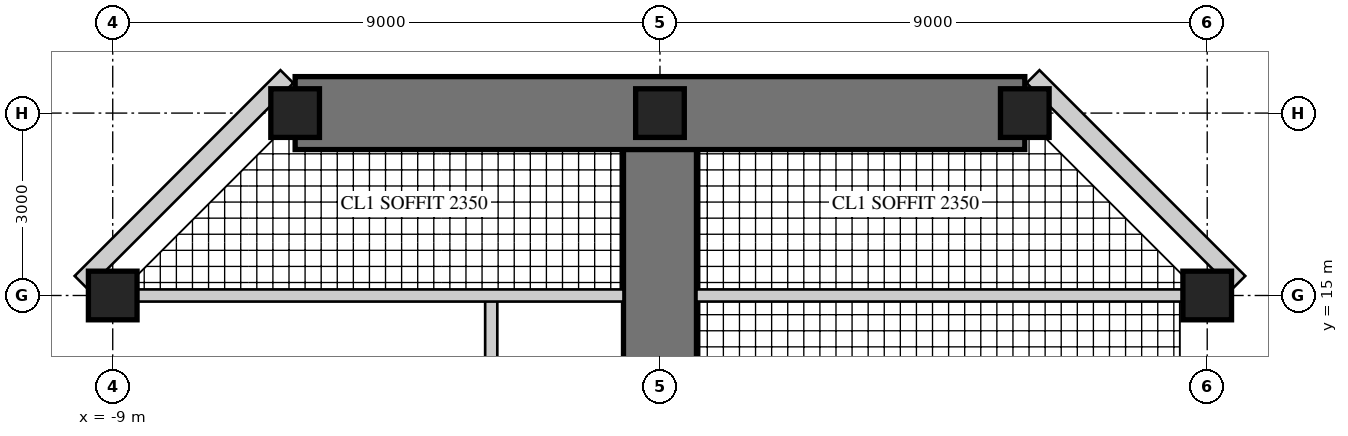
"""IFC4 building model, lengths in metres.
Left out: names, types, materials, properties, quantities, classifications, styles, units other than length and angle.
Written with IfcOpenShell. Run it as: python <this file> out.ifc"""

import sys

from ifc_helpers import new_model, si_unit, direction, frame, frame_2d, origin, origin_2d, place, context, subcontext, project, spatial, rectangle, hollow_rectangle, extrude, element, fill, save


model = new_model("IFC4")
c1 = context("Model", 3, precision=1e-05, world=origin(), true_north=direction((0.0, 1.0)))
c2 = subcontext(c1, "Body", "Model", "MODEL_VIEW")
j1 = project(units=[si_unit("LENGTHUNIT", "METRE"), si_unit("PLANEANGLEUNIT", "RADIAN")], contexts=[c1])
p1 = place(None, origin())
s1 = spatial("IfcSite", under=j1, at=p1, CompositionType="ELEMENT")
p2 = place(p1, origin())
s2 = spatial("IfcBuilding", under=s1, at=p2, CompositionType="ELEMENT")
p3 = place(p2, frame((0.0, 0.0, 235.7)))
s3 = spatial("IfcBuildingStorey", under=s2, at=p3, CompositionType="ELEMENT", Elevation=235.7)
p4 = place(p3, frame((0.0, 9.0, 0.0), z_axis=(0.0, 0.0, 1.0), x_axis=(0.0, 1.0, 0.0)))
e1 = element("IfcWall", 1, at=p4, inside=s3, PredefinedType="SHEAR", context=c2, shape_type="SweptSolid", body=[
    extrude(rectangle(XDim=9.0, YDim=1.2, at=frame_2d((4.5, 0.0))), origin(), (0.0, 0.0, 1.0), 3.4),
])
p5 = place(p4, frame((3.8, 0.0, 0.0)))
e2 = element("IfcOpeningElement", 2, at=p5, cuts=e1, PredefinedType="OPENING", context=c2, shape_type="SweptSolid", body=[
    extrude(rectangle(XDim=1.0, YDim=2.15, at=frame_2d((0.5, 1.075))), frame((0.0, 0.61, 0.0), z_axis=(0.0, -1.0, 0.0), x_axis=(1.0, 0.0, 0.0)), (0.0, 0.0, 1.0), 1.22),
])
p6 = place(p4, frame((7.0, 0.0, 0.0)))
e3 = element("IfcOpeningElement", 3, at=p6, cuts=e1, PredefinedType="OPENING", context=c2, shape_type="SweptSolid", body=[
    extrude(rectangle(XDim=1.0, YDim=2.2, at=frame_2d((0.5, 1.1))), frame((0.0, 0.61, 0.0), z_axis=(0.0, -1.0, 0.0), x_axis=(1.0, 0.0, 0.0)), (0.0, 0.0, 1.0), 1.22),
])
p7 = place(p3, frame((6.0, 18.0, 0.0), z_axis=(0.0, 0.0, 1.0), x_axis=(-1.0, 0.0, 0.0)))
e4 = element("IfcWall", 4, at=p7, inside=s3, PredefinedType="SHEAR", context=c2, shape_type="SweptSolid", body=[
    extrude(rectangle(XDim=12.0, YDim=1.2, at=frame_2d((6.0, 0.0))), origin(), (0.0, 0.0, 1.0), 3.4),
])
p8 = place(p7, frame((1.5, 0.0, 0.6)))
e5 = element("IfcOpeningElement", 5, at=p8, cuts=e4, PredefinedType="OPENING", context=c2, shape_type="SweptSolid", body=[
    extrude(rectangle(XDim=3.0, YDim=2.4, at=frame_2d((1.5, 1.2))), frame((0.0, 0.61, 0.0), z_axis=(0.0, -1.0, 0.0), x_axis=(1.0, 0.0, 0.0)), (0.0, 0.0, 1.0), 1.22),
])
p9 = place(p7, frame((7.5, 0.0, 0.6)))
e6 = element("IfcOpeningElement", 6, at=p9, cuts=e4, PredefinedType="OPENING", context=c2, shape_type="SweptSolid", body=[
    extrude(rectangle(XDim=3.0, YDim=2.4, at=frame_2d((1.5, 1.2))), frame((0.0, 0.61, 0.0), z_axis=(0.0, -1.0, 0.0), x_axis=(1.0, 0.0, 0.0)), (0.0, 0.0, 1.0), 1.22),
])
for number, where, z_axis, x_axis in (
    (7, (9.0, 15.0, 0.0), (0.0, 0.0, 1.0), (1.0, 0.0, 0.0)),
    (8, (-9.0, 15.0, 0.0), (0.0, 0.0, 1.0), (1.0, 0.0, 0.0)),
    (9, (6.0, 18.0, 0.0), (0.0, 0.0, 1.0), (1.0, 0.0, 0.0)),
    (10, (0.0, 18.0, 0.0), (0.0, 0.0, 1.0), (1.0, 0.0, 0.0)),
    (11, (-6.0, 18.0, 0.0), (0.0, 0.0, 1.0), (1.0, 0.0, 0.0)),
):
    element("IfcColumn", number, at=place(p3, frame(where, z_axis=z_axis, x_axis=x_axis)), inside=s3, PredefinedType="COLUMN", context=c2, shape_type="SweptSolid", body=[
        extrude(rectangle(XDim=0.8, YDim=0.8, at=origin_2d()), origin(), (0.0, 0.0, 1.0), 3.4),
    ])
p10 = place(p3, frame((9.52, 15.215, 0.0), z_axis=(0.0, 0.0, 1.0), x_axis=(-0.707081278264, 0.707132283189, 0.0)))
e12 = element("IfcWall", 12, at=p10, inside=s3, PredefinedType="SOLIDWALL", context=c2, shape_type="SweptSolid", body=[
    extrude(rectangle(XDim=4.787, YDim=0.3, at=frame_2d((2.393, 0.0))), origin(), (0.0, 0.0, 1.0), 3.22),
])
p11 = place(p10, frame((1.943, 0.0, 0.3)))
e13 = element("IfcOpeningElement", 13, at=p11, cuts=e12, PredefinedType="OPENING", context=c2, shape_type="SweptSolid", body=[
    extrude(rectangle(XDim=0.9, YDim=2.4, at=frame_2d((0.45, 1.2))), frame((0.0, 0.16, 0.0), z_axis=(0.0, -1.0, 0.0), x_axis=(1.0, 0.0, 0.0)), (0.0, 0.0, 1.0), 0.32),
])
p12 = place(p3, frame((-6.135, 18.6, 0.0), z_axis=(0.0, 0.0, 1.0), x_axis=(-0.707081278264, -0.707132283189, 0.0)))
e14 = element("IfcWall", 14, at=p12, inside=s3, PredefinedType="SOLIDWALL", context=c2, shape_type="SweptSolid", body=[
    extrude(rectangle(XDim=4.787, YDim=0.3, at=frame_2d((2.393, 0.0))), origin(), (0.0, 0.0, 1.0), 3.22),
])
p13 = place(p12, frame((1.943, 0.0, 0.3)))
e15 = element("IfcOpeningElement", 15, at=p13, cuts=e14, PredefinedType="OPENING", context=c2, shape_type="SweptSolid", body=[
    extrude(rectangle(XDim=0.9, YDim=2.4, at=frame_2d((0.45, 1.2))), frame((0.0, 0.16, 0.0), z_axis=(0.0, -1.0, 0.0), x_axis=(1.0, 0.0, 0.0)), (0.0, 0.0, 1.0), 0.32),
])
p14 = place(p3, frame((-2.775, 9.4, 0.0), z_axis=(0.0, 0.0, 1.0), x_axis=(0.0, 1.0, 0.0)))
e16 = element("IfcWall", 16, at=p14, inside=s3, PredefinedType="SOLIDWALL", context=c2, shape_type="SweptSolid", body=[
    extrude(rectangle(XDim=5.6, YDim=0.2, at=frame_2d((2.8, 0.0))), origin(), (0.0, 0.0, 1.0), 3.22),
])
p15 = place(p14, frame((3.75, 0.0, 0.0)))
e17 = element("IfcOpeningElement", 17, at=p15, cuts=e16, PredefinedType="OPENING", context=c2, shape_type="SweptSolid", body=[
    extrude(rectangle(XDim=1.0, YDim=2.15, at=frame_2d((0.5, 1.075))), frame((0.0, 0.11, 0.0), z_axis=(0.0, -1.0, 0.0), x_axis=(1.0, 0.0, 0.0)), (0.0, 0.0, 1.0), 0.22),
])
p16 = place(p3, frame((8.6, 15.0, 0.0), z_axis=(0.0, 0.0, 1.0), x_axis=(-1.0, 0.0, 0.0)))
e18 = element("IfcWall", 18, at=p16, inside=s3, PredefinedType="SOLIDWALL", context=c2, shape_type="SweptSolid", body=[
    extrude(rectangle(XDim=8.0, YDim=0.2, at=frame_2d((4.0, 0.0))), origin(), (0.0, 0.0, 1.0), 2.52),
])
p17 = place(p3, frame((-0.6, 15.0, 0.0), z_axis=(0.0, 0.0, 1.0), x_axis=(-1.0, 0.0, 0.0)))
e19 = element("IfcWall", 19, at=p17, inside=s3, PredefinedType="SOLIDWALL", context=c2, shape_type="SweptSolid", body=[
    extrude(rectangle(XDim=8.0, YDim=0.2, at=frame_2d((4.0, 0.0))), origin(), (0.0, 0.0, 1.0), 2.52),
])
p18 = place(p17, frame((0.35, 0.0, 0.0)))
e20 = element("IfcOpeningElement", 20, at=p18, cuts=e19, PredefinedType="OPENING", context=c2, shape_type="SweptSolid", body=[
    extrude(rectangle(XDim=1.0, YDim=2.2, at=frame_2d((0.5, 1.1))), frame((0.0, 0.11, 0.0), z_axis=(0.0, -1.0, 0.0), x_axis=(1.0, 0.0, 0.0)), (0.0, 0.0, 1.0), 0.22),
])
p19 = place(p11, origin())
e21 = element("IfcWindow", 21, at=p19, inside=s3, PartitioningType="SINGLE_PANEL", PredefinedType="WINDOW", context=c2, shape_type="SweptSolid", body=[
    extrude(hollow_rectangle(XDim=0.9, YDim=2.4, WallThickness=0.06, at=frame_2d((0.45, 1.2))), frame((0.0, 0.03, 0.0), z_axis=(0.0, -1.0, 0.0), x_axis=(1.0, 0.0, 0.0)), (0.0, 0.0, 1.0), 0.06),
    extrude(rectangle(XDim=0.779, YDim=2.279, at=frame_2d((0.45, 1.2))), frame((0.0, 0.03, 0.0), z_axis=(0.0, -1.0, 0.0), x_axis=(1.0, 0.0, 0.0)), (0.0, 0.0, 1.0), 0.06),
])
fill(e13, e21)
p20 = place(p8, origin())
e22 = element("IfcWindow", 22, at=p20, inside=s3, PartitioningType="SINGLE_PANEL", PredefinedType="WINDOW", context=c2, shape_type="SweptSolid", body=[
    extrude(hollow_rectangle(XDim=3.0, YDim=2.4, WallThickness=0.06, at=frame_2d((1.5, 1.2))), frame((0.0, 0.03, 0.0), z_axis=(0.0, -1.0, 0.0), x_axis=(1.0, 0.0, 0.0)), (0.0, 0.0, 1.0), 0.06),
    extrude(rectangle(XDim=2.879, YDim=2.279, at=frame_2d((1.5, 1.2))), frame((0.0, 0.03, 0.0), z_axis=(0.0, -1.0, 0.0), x_axis=(1.0, 0.0, 0.0)), (0.0, 0.0, 1.0), 0.06),
])
fill(e5, e22)
p21 = place(p9, origin())
e23 = element("IfcWindow", 23, at=p21, inside=s3, PartitioningType="SINGLE_PANEL", PredefinedType="WINDOW", context=c2, shape_type="SweptSolid", body=[
    extrude(hollow_rectangle(XDim=3.0, YDim=2.4, WallThickness=0.06, at=frame_2d((1.5, 1.2))), frame((0.0, 0.03, 0.0), z_axis=(0.0, -1.0, 0.0), x_axis=(1.0, 0.0, 0.0)), (0.0, 0.0, 1.0), 0.06),
    extrude(rectangle(XDim=2.879, YDim=2.279, at=frame_2d((1.5, 1.2))), frame((0.0, 0.03, 0.0), z_axis=(0.0, -1.0, 0.0), x_axis=(1.0, 0.0, 0.0)), (0.0, 0.0, 1.0), 0.06),
])
fill(e6, e23)
p22 = place(p13, origin())
e24 = element("IfcWindow", 24, at=p22, inside=s3, PartitioningType="SINGLE_PANEL", PredefinedType="WINDOW", context=c2, shape_type="SweptSolid", body=[
    extrude(hollow_rectangle(XDim=0.9, YDim=2.4, WallThickness=0.06, at=frame_2d((0.45, 1.2))), frame((0.0, 0.03, 0.0), z_axis=(0.0, -1.0, 0.0), x_axis=(1.0, 0.0, 0.0)), (0.0, 0.0, 1.0), 0.06),
    extrude(rectangle(XDim=0.779, YDim=2.279, at=frame_2d((0.45, 1.2))), frame((0.0, 0.03, 0.0), z_axis=(0.0, -1.0, 0.0), x_axis=(1.0, 0.0, 0.0)), (0.0, 0.0, 1.0), 0.06),
])
fill(e15, e24)
p23 = place(p15, origin())
e25 = element("IfcDoor", 25, at=p23, inside=s3, OperationType="SINGLE_SWING_LEFT", PredefinedType="DOOR", context=c2, shape_type="SweptSolid", body=[
    extrude(rectangle(XDim=1.0, YDim=2.15, at=frame_2d((0.5, 1.075))), frame((0.0, 0.025, 0.0), z_axis=(0.0, -1.0, 0.0), x_axis=(1.0, 0.0, 0.0)), (0.0, 0.0, 1.0), 0.05),
])
fill(e17, e25)
p24 = place(p18, frame((1.0, 0.0, 0.0), z_axis=(0.0, 0.0, 1.0), x_axis=(-1.0, 0.0, 0.0)))
e26 = element("IfcDoor", 26, at=p24, inside=s3, OperationType="SINGLE_SWING_RIGHT", PredefinedType="DOOR", context=c2, shape_type="SweptSolid", body=[
    extrude(rectangle(XDim=1.0, YDim=2.2, at=frame_2d((0.5, 1.1))), frame((0.0, 0.025, 0.0), z_axis=(0.0, -1.0, 0.0), x_axis=(1.0, 0.0, 0.0)), (0.0, 0.0, 1.0), 0.05),
])
fill(e20, e26)
p25 = place(p6, origin())
e27 = element("IfcDoor", 27, at=p25, inside=s3, OperationType="SINGLE_SWING_RIGHT", PredefinedType="DOOR", context=c2, shape_type="SweptSolid", body=[
    extrude(rectangle(XDim=1.0, YDim=2.2, at=frame_2d((0.5, 1.1))), frame((0.0, 0.025, 0.0), z_axis=(0.0, -1.0, 0.0), x_axis=(1.0, 0.0, 0.0)), (0.0, 0.0, 1.0), 0.05),
])
fill(e3, e27)
save(model, sys.argv[1])
